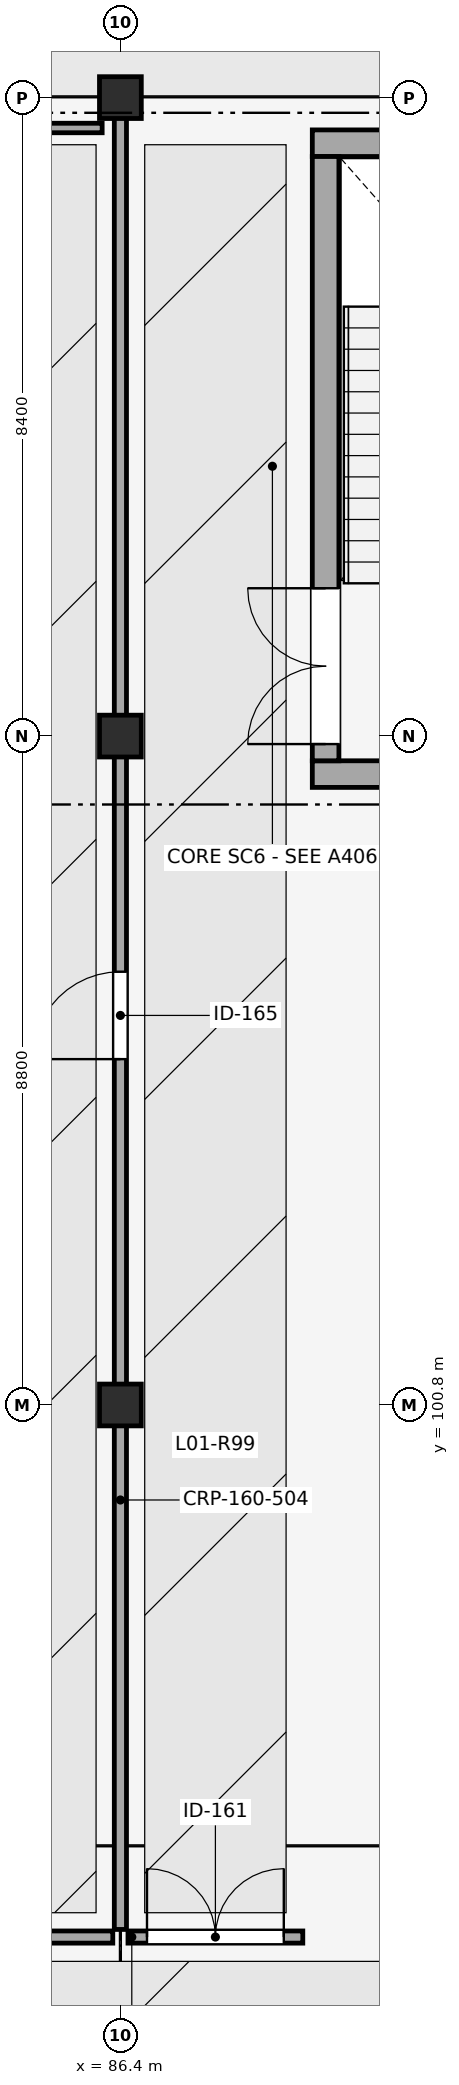
"""IFC4 building model, lengths in metres.
Left out: names, types, materials, properties, quantities, classifications, styles, units other than length and angle.
Written with IfcOpenShell. Run it as: python <this file> out.ifc"""

import sys

from ifc_helpers import new_model, si_unit, direction, frame, frame_2d, origin, origin_2d, place, context, subcontext, project, spatial, rectangle, extrude, element, fill, save


model = new_model("IFC4")
c1 = context("Model", 3, precision=1e-05, world=origin(), true_north=direction((0.0, 1.0)))
c2 = subcontext(c1, "Body", "Model", "MODEL_VIEW")
j1 = project(units=[si_unit("LENGTHUNIT", "METRE"), si_unit("PLANEANGLEUNIT", "RADIAN")], contexts=[c1])
p1 = place(None, origin())
s1 = spatial("IfcSite", under=j1, at=p1, CompositionType="ELEMENT")
p2 = place(p1, origin())
s2 = spatial("IfcBuilding", under=s1, at=p2, CompositionType="ELEMENT")
p3 = place(p2, frame((0.0, 0.0, 4.8)))
s3 = spatial("IfcBuildingStorey", under=s2, at=p3, CompositionType="ELEMENT", Elevation=4.8)
for number, where, z_axis, x_axis in (
    (1, (86.4, 100.8, 0.0), (0.0, 0.0, 1.0), (1.0, 0.0, 0.0)),
    (2, (86.4, 109.6, 0.0), (0.0, 0.0, 1.0), (1.0, 0.0, 0.0)),
    (3, (86.4, 118.0, 0.0), (0.0, 0.0, 1.0), (1.0, 0.0, 0.0)),
):
    element("IfcColumn", number, at=place(p3, frame(where, z_axis=z_axis, x_axis=x_axis)), inside=s3, PredefinedType="COLUMN", context=c2, shape_type="SweptSolid", body=[
        extrude(rectangle(XDim=0.55, YDim=0.55, at=origin_2d()), origin(), (0.0, 0.0, 1.0), 4.8),
    ])
for number, where, z_axis, x_axis in (
    (4, (94.575, 109.1, 0.0), (0.0, 0.0, 1.0), (-1.0, 0.0, 0.0)),
    (5, (88.925, 117.4, 0.0), (0.0, 0.0, 1.0), (1.0, 0.0, 0.0)),
):
    element("IfcWall", number, at=place(p3, frame(where, z_axis=z_axis, x_axis=x_axis)), inside=s3, PredefinedType="SHEAR", context=c2, shape_type="SweptSolid", body=[
        extrude(rectangle(XDim=5.65, YDim=0.35, at=frame_2d((2.825, 0.0))), origin(), (0.0, 0.0, 1.0), 4.55),
    ])
p4 = place(p3, frame((89.1, 109.275, 0.0), z_axis=(0.0, 0.0, 1.0), x_axis=(0.0, 1.0, 0.0)))
e6 = element("IfcWall", 6, at=p4, inside=s3, PredefinedType="SHEAR", context=c2, shape_type="SweptSolid", body=[
    extrude(rectangle(XDim=7.95, YDim=0.35, at=frame_2d((3.975, 0.0))), origin(), (0.0, 0.0, 1.0), 4.55),
])
p5 = place(p4, frame((0.22, 0.0, 0.0)))
e7 = element("IfcOpeningElement", 7, at=p5, cuts=e6, PredefinedType="OPENING", context=c2, shape_type="SweptSolid", body=[
    extrude(rectangle(XDim=2.05, YDim=2.15, at=frame_2d((1.025, 1.075))), frame((0.0, 0.185, 0.0), z_axis=(0.0, -1.0, 0.0), x_axis=(1.0, 0.0, 0.0)), (0.0, 0.0, 1.0), 0.37),
])
p6 = place(p3, frame((86.5, 93.8, 0.0), z_axis=(0.0, 0.0, 1.0), x_axis=(1.0, 0.0, 0.0)))
e8 = element("IfcWall", 8, at=p6, inside=s3, PredefinedType="PARTITIONING", context=c2, shape_type="SweptSolid", body=[
    extrude(rectangle(XDim=2.3, YDim=0.16, at=frame_2d((1.15, 0.0))), origin(), (0.0, 0.0, 1.0), 4.42),
])
p7 = place(p6, frame((0.25, 0.0, 0.0)))
e9 = element("IfcOpeningElement", 9, at=p7, cuts=e8, PredefinedType="OPENING", context=c2, shape_type="SweptSolid", body=[
    extrude(rectangle(XDim=1.8, YDim=2.15, at=frame_2d((0.9, 1.075))), frame((0.0, 0.09, 0.0), z_axis=(0.0, -1.0, 0.0), x_axis=(1.0, 0.0, 0.0)), (0.0, 0.0, 1.0), 0.18),
])
p8 = place(p3, frame((67.3, 93.8, 0.0), z_axis=(0.0, 0.0, 1.0), x_axis=(1.0, 0.0, 0.0)))
e10 = element("IfcWall", 10, at=p8, inside=s3, PredefinedType="PARTITIONING", context=c2, shape_type="SweptSolid", body=[
    extrude(rectangle(XDim=19.0, YDim=0.16, at=frame_2d((9.5, 0.0))), origin(), (0.0, 0.0, 1.0), 4.42),
])
p9 = place(p8, frame((8.925, 0.0, 0.0)))
e11 = element("IfcOpeningElement", 11, at=p9, cuts=e10, PredefinedType="OPENING", context=c2, shape_type="SweptSolid", body=[
    extrude(rectangle(XDim=1.15, YDim=2.2, at=frame_2d((0.575, 1.1))), frame((0.0, 0.09, 0.0), z_axis=(0.0, -1.0, 0.0), x_axis=(1.0, 0.0, 0.0)), (0.0, 0.0, 1.0), 0.18),
])
p10 = place(p3, frame((86.4, 93.9, 0.0), z_axis=(0.0, 0.0, 1.0), x_axis=(0.0, 1.0, 0.0)))
e12 = element("IfcWall", 12, at=p10, inside=s3, PredefinedType="PARTITIONING", context=c2, shape_type="SweptSolid", body=[
    extrude(rectangle(XDim=24.05, YDim=0.16, at=frame_2d((12.025, 0.0))), origin(), (0.0, 0.0, 1.0), 4.037),
])
p11 = place(p10, frame((11.45, 0.0, 0.0)))
e13 = element("IfcOpeningElement", 13, at=p11, cuts=e12, PredefinedType="OPENING", context=c2, shape_type="SweptSolid", body=[
    extrude(rectangle(XDim=1.15, YDim=2.2, at=frame_2d((0.575, 1.1))), frame((0.0, 0.09, 0.0), z_axis=(0.0, -1.0, 0.0), x_axis=(1.0, 0.0, 0.0)), (0.0, 0.0, 1.0), 0.18),
])
p12 = place(p3, frame((67.44, 117.6, 0.0), z_axis=(0.0, 0.0, 1.0), x_axis=(1.0, 0.0, 0.0)))
e14 = element("IfcWall", 14, at=p12, inside=s3, PredefinedType="PARTITIONING", context=c2, shape_type="SweptSolid", body=[
    extrude(rectangle(XDim=18.72, YDim=0.125, at=frame_2d((9.36, 0.0))), origin(), (0.0, 0.0, 1.0), 4.42),
])
p13 = place(p5, origin())
e15 = element("IfcDoor", 15, at=p13, inside=s3, OperationType="DOUBLE_DOOR_SINGLE_SWING", PredefinedType="DOOR", context=c2, shape_type="SweptSolid", body=[
    extrude(rectangle(XDim=2.05, YDim=2.15, at=frame_2d((1.025, 1.075))), frame((0.0, 0.025, 0.0), z_axis=(0.0, -1.0, 0.0), x_axis=(1.0, 0.0, 0.0)), (0.0, 0.0, 1.0), 0.05),
])
fill(e7, e15)
p14 = place(p7, origin())
e16 = element("IfcDoor", 16, at=p14, inside=s3, OperationType="DOUBLE_DOOR_SINGLE_SWING", PredefinedType="DOOR", context=c2, shape_type="SweptSolid", body=[
    extrude(rectangle(XDim=1.8, YDim=2.15, at=frame_2d((0.9, 1.075))), frame((0.0, 0.025, 0.0), z_axis=(0.0, -1.0, 0.0), x_axis=(1.0, 0.0, 0.0)), (0.0, 0.0, 1.0), 0.05),
])
fill(e9, e16)
p15 = place(p11, origin())
e17 = element("IfcDoor", 17, at=p15, inside=s3, OperationType="SINGLE_SWING_LEFT", PredefinedType="DOOR", context=c2, shape_type="SweptSolid", body=[
    extrude(rectangle(XDim=1.15, YDim=2.2, at=frame_2d((0.575, 1.1))), frame((0.0, 0.025, 0.0), z_axis=(0.0, -1.0, 0.0), x_axis=(1.0, 0.0, 0.0)), (0.0, 0.0, 1.0), 0.05),
])
fill(e13, e17)
save(model, sys.argv[1])
